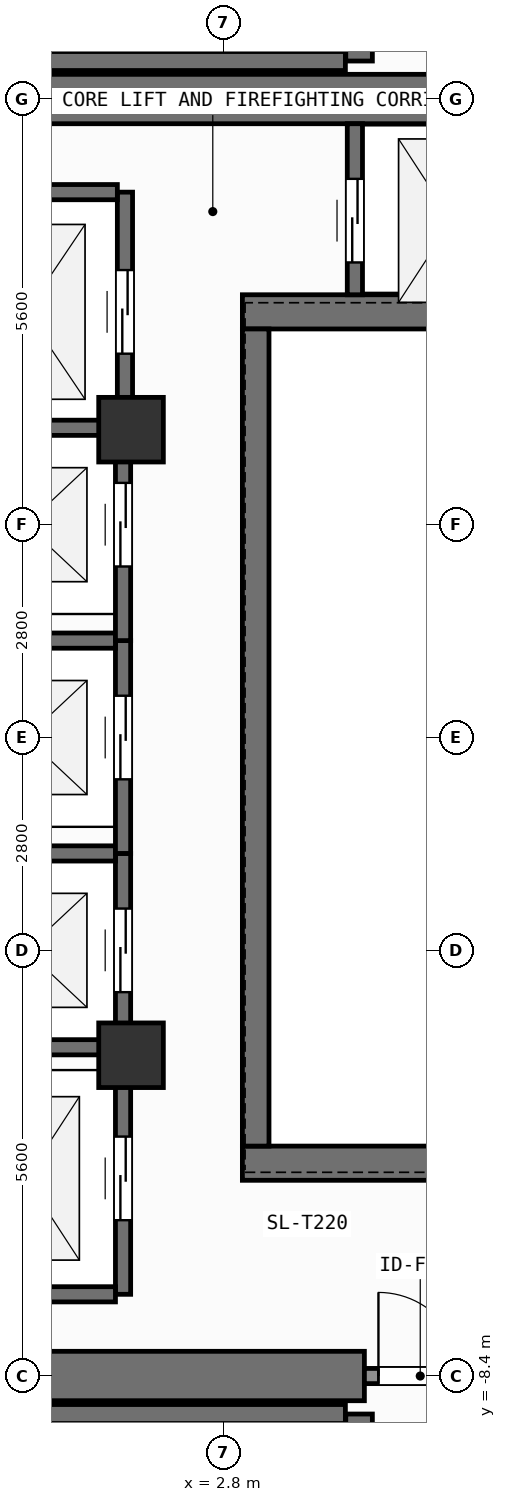
"""IFC4 building model, lengths in metres.
Left out: names, types, materials, properties, quantities, classifications, styles, units other than length and angle.
Written with IfcOpenShell. Run it as: python <this file> out.ifc"""

import sys

from ifc_helpers import new_model, si_unit, direction, frame, frame_2d, origin, origin_2d, place, context, subcontext, project, spatial, rectangle, extrude, element, fill, save


model = new_model("IFC4")
c1 = context("Model", 3, precision=1e-05, world=origin(), true_north=direction((0.0, 1.0)))
c2 = subcontext(c1, "Body", "Model", "MODEL_VIEW")
j1 = project(units=[si_unit("LENGTHUNIT", "METRE"), si_unit("PLANEANGLEUNIT", "RADIAN")], contexts=[c1])
p1 = place(None, origin())
s1 = spatial("IfcSite", under=j1, at=p1, CompositionType="ELEMENT")
p2 = place(p1, origin())
s2 = spatial("IfcBuilding", under=s1, at=p2, CompositionType="ELEMENT")
p3 = place(p2, frame((0.0, 0.0, 250.8)))
s3 = spatial("IfcBuildingStorey", under=s2, at=p3, CompositionType="ELEMENT", Elevation=250.8)
p4 = place(p3, frame((-2.62, -8.4, 0.0), z_axis=(0.0, 0.0, 1.0), x_axis=(1.0, 0.0, 0.0)))
e1 = element("IfcWall", 1, at=p4, inside=s3, PredefinedType="SHEAR", context=c2, shape_type="SweptSolid", body=[
    extrude(rectangle(XDim=7.27, YDim=0.65, at=frame_2d((3.635, 0.0))), origin(), (0.0, 0.0, 1.0), 3.9),
])
p5 = place(p3, frame((-7.55, 8.4, 0.0), z_axis=(0.0, 0.0, 1.0), x_axis=(1.0, 0.0, 0.0)))
e2 = element("IfcWall", 2, at=p5, inside=s3, PredefinedType="SHEAR", context=c2, shape_type="SweptSolid", body=[
    extrude(rectangle(XDim=16.275, YDim=0.65, at=frame_2d((8.138, 0.0))), origin(), (0.0, 0.0, 1.0), 3.9),
])
for number, where, z_axis, x_axis in (
    (3, (3.045, -5.6, 0.0), (0.0, 0.0, 1.0), (1.0, 0.0, 0.0)),
    (4, (3.045, 5.6, 0.0), (0.0, 0.0, 1.0), (1.0, 0.0, 0.0)),
):
    element("IfcWall", number, at=place(p3, frame(where, z_axis=z_axis, x_axis=x_axis)), inside=s3, PredefinedType="SHEAR", context=c2, shape_type="SweptSolid", body=[
        extrude(rectangle(XDim=5.68, YDim=0.45, at=frame_2d((2.84, 0.0))), origin(), (0.0, 0.0, 1.0), 3.9),
    ])
p6 = place(p3, frame((3.22, -5.375, 0.0), z_axis=(0.0, 0.0, 1.0), x_axis=(0.0, 1.0, 0.0)))
e5 = element("IfcWall", 5, at=p6, inside=s3, PredefinedType="SHEAR", context=c2, shape_type="SweptSolid", body=[
    extrude(rectangle(XDim=10.75, YDim=0.35, at=frame_2d((5.375, 0.0))), origin(), (0.0, 0.0, 1.0), 3.9),
])
p7 = place(p3, frame((-2.2, -8.9, 0.0), z_axis=(0.0, 0.0, 1.0), x_axis=(1.0, 0.0, 0.0)))
e6 = element("IfcWall", 6, at=p7, inside=s3, PredefinedType="SHEAR", context=c2, shape_type="SweptSolid", body=[
    extrude(rectangle(XDim=6.6, YDim=0.25, at=frame_2d((3.3, 0.0))), origin(), (0.0, 0.0, 1.0), 3.9),
])
p8 = place(p3, frame((4.58, -8.9, 0.0), z_axis=(0.0, 0.0, 1.0), x_axis=(0.0, -1.0, 0.0)))
e7 = element("IfcWall", 7, at=p8, inside=s3, PredefinedType="SHEAR", context=c2, shape_type="SweptSolid", body=[
    extrude(rectangle(XDim=2.925, YDim=0.35, at=frame_2d((1.462, 0.0))), origin(), (0.0, 0.0, 1.0), 3.9),
])
p9 = place(p8, frame((0.913, 0.0, 0.0)))
e8 = element("IfcOpeningElement", 8, at=p9, cuts=e7, PredefinedType="OPENING", context=c2, shape_type="SweptSolid", body=[
    extrude(rectangle(XDim=1.1, YDim=2.15, at=frame_2d((0.55, 1.075))), frame((0.0, 0.185, 0.0), z_axis=(0.0, -1.0, 0.0), x_axis=(1.0, 0.0, 0.0)), (0.0, 0.0, 1.0), 0.37),
])
p10 = place(p3, frame((-2.2, 8.9, 0.0), z_axis=(0.0, 0.0, 1.0), x_axis=(1.0, 0.0, 0.0)))
e9 = element("IfcWall", 9, at=p10, inside=s3, PredefinedType="SHEAR", context=c2, shape_type="SweptSolid", body=[
    extrude(rectangle(XDim=6.6, YDim=0.25, at=frame_2d((3.3, 0.0))), origin(), (0.0, 0.0, 1.0), 3.9),
])
p11 = place(p3, frame((4.58, 11.825, 0.0), z_axis=(0.0, 0.0, 1.0), x_axis=(0.0, -1.0, 0.0)))
e10 = element("IfcWall", 10, at=p11, inside=s3, PredefinedType="SHEAR", context=c2, shape_type="SweptSolid", body=[
    extrude(rectangle(XDim=2.925, YDim=0.35, at=frame_2d((1.462, 0.0))), origin(), (0.0, 0.0, 1.0), 3.9),
])
p12 = place(p11, frame((0.913, 0.0, 0.0)))
e11 = element("IfcOpeningElement", 11, at=p12, cuts=e10, PredefinedType="OPENING", context=c2, shape_type="SweptSolid", body=[
    extrude(rectangle(XDim=1.1, YDim=2.15, at=frame_2d((0.55, 1.075))), frame((0.0, 0.185, 0.0), z_axis=(0.0, -1.0, 0.0), x_axis=(1.0, 0.0, 0.0)), (0.0, 0.0, 1.0), 0.37),
])
for number, where, z_axis, x_axis in (
    (12, (1.58, -4.18, 0.0), (0.0, 0.0, 1.0), (1.0, 0.0, 0.0)),
    (13, (1.58, 4.05, 0.0), (0.0, 0.0, 1.0), (1.0, 0.0, 0.0)),
):
    element("IfcColumn", number, at=place(p3, frame(where, z_axis=z_axis, x_axis=x_axis)), inside=s3, PredefinedType="COLUMN", context=c2, shape_type="SweptSolid", body=[
        extrude(rectangle(XDim=0.85, YDim=0.85, at=origin_2d()), origin(), (0.0, 0.0, 1.0), 3.9),
    ])
p13 = place(p3, frame((1.475, -4.275, 0.0), z_axis=(0.0, 0.0, 1.0), x_axis=(0.0, 1.0, 0.0)))
e14 = element("IfcWall", 14, at=p13, inside=s3, PredefinedType="SHEAR", context=c2, shape_type="SweptSolid", body=[
    extrude(rectangle(XDim=2.75, YDim=0.2, at=frame_2d((1.375, 0.0))), origin(), (0.0, 0.0, 1.0), 3.62),
])
p14 = place(p13, frame((0.925, 0.0, 0.0)))
e15 = element("IfcOpeningElement", 15, at=p14, cuts=e14, PredefinedType="OPENING", context=c2, shape_type="SweptSolid", body=[
    extrude(rectangle(XDim=1.1, YDim=2.2, at=frame_2d((0.55, 1.1))), frame((0.0, 0.11, 0.0), z_axis=(0.0, -1.0, 0.0), x_axis=(1.0, 0.0, 0.0)), (0.0, 0.0, 1.0), 0.22),
])
for number, where, z_axis, x_axis in (
    (16, (-0.975, -4.075, 0.0), (0.0, 0.0, 1.0), (1.0, 0.0, 0.0)),
    (17, (-0.975, -1.525, 0.0), (0.0, 0.0, 1.0), (1.0, 0.0, 0.0)),
):
    element("IfcWall", number, at=place(p3, frame(where, z_axis=z_axis, x_axis=x_axis)), inside=s3, PredefinedType="SHEAR", context=c2, shape_type="SweptSolid", body=[
        extrude(rectangle(XDim=2.35, YDim=0.2, at=frame_2d((1.175, 0.0))), origin(), (0.0, 0.0, 1.0), 3.62),
    ])
p15 = place(p3, frame((1.475, -1.525, 0.0), z_axis=(0.0, 0.0, 1.0), x_axis=(0.0, 1.0, 0.0)))
e18 = element("IfcWall", 18, at=p15, inside=s3, PredefinedType="SHEAR", context=c2, shape_type="SweptSolid", body=[
    extrude(rectangle(XDim=2.8, YDim=0.2, at=frame_2d((1.4, 0.0))), origin(), (0.0, 0.0, 1.0), 3.62),
])
p16 = place(p15, frame((0.975, 0.0, 0.0)))
e19 = element("IfcOpeningElement", 19, at=p16, cuts=e18, PredefinedType="OPENING", context=c2, shape_type="SweptSolid", body=[
    extrude(rectangle(XDim=1.1, YDim=2.2, at=frame_2d((0.55, 1.1))), frame((0.0, 0.11, 0.0), z_axis=(0.0, -1.0, 0.0), x_axis=(1.0, 0.0, 0.0)), (0.0, 0.0, 1.0), 0.22),
])
p17 = place(p3, frame((-0.975, 1.275, 0.0), z_axis=(0.0, 0.0, 1.0), x_axis=(1.0, 0.0, 0.0)))
e20 = element("IfcWall", 20, at=p17, inside=s3, PredefinedType="SHEAR", context=c2, shape_type="SweptSolid", body=[
    extrude(rectangle(XDim=2.35, YDim=0.2, at=frame_2d((1.175, 0.0))), origin(), (0.0, 0.0, 1.0), 3.62),
])
p18 = place(p3, frame((1.475, 1.275, 0.0), z_axis=(0.0, 0.0, 1.0), x_axis=(0.0, 1.0, 0.0)))
e21 = element("IfcWall", 21, at=p18, inside=s3, PredefinedType="SHEAR", context=c2, shape_type="SweptSolid", body=[
    extrude(rectangle(XDim=2.8, YDim=0.2, at=frame_2d((1.4, 0.0))), origin(), (0.0, 0.0, 1.0), 3.62),
])
p19 = place(p18, frame((0.975, 0.0, 0.0)))
e22 = element("IfcOpeningElement", 22, at=p19, cuts=e21, PredefinedType="OPENING", context=c2, shape_type="SweptSolid", body=[
    extrude(rectangle(XDim=1.1, YDim=2.2, at=frame_2d((0.55, 1.1))), frame((0.0, 0.11, 0.0), z_axis=(0.0, -1.0, 0.0), x_axis=(1.0, 0.0, 0.0)), (0.0, 0.0, 1.0), 0.22),
])
p20 = place(p3, frame((-0.975, 4.075, 0.0), z_axis=(0.0, 0.0, 1.0), x_axis=(1.0, 0.0, 0.0)))
e23 = element("IfcWall", 23, at=p20, inside=s3, PredefinedType="SHEAR", context=c2, shape_type="SweptSolid", body=[
    extrude(rectangle(XDim=2.35, YDim=0.2, at=frame_2d((1.175, 0.0))), origin(), (0.0, 0.0, 1.0), 3.62),
])
p21 = place(p3, frame((1.5, 4.025, 0.0), z_axis=(0.0, 0.0, 1.0), x_axis=(0.0, 1.0, 0.0)))
e24 = element("IfcWall", 24, at=p21, inside=s3, PredefinedType="SHEAR", context=c2, shape_type="SweptSolid", body=[
    extrude(rectangle(XDim=3.15, YDim=0.2, at=frame_2d((1.575, 0.0))), origin(), (0.0, 0.0, 1.0), 3.62),
])
p22 = place(p21, frame((1.025, 0.0, 0.0)))
e25 = element("IfcOpeningElement", 25, at=p22, cuts=e24, PredefinedType="OPENING", context=c2, shape_type="SweptSolid", body=[
    extrude(rectangle(XDim=1.1, YDim=2.2, at=frame_2d((0.55, 1.1))), frame((0.0, 0.11, 0.0), z_axis=(0.0, -1.0, 0.0), x_axis=(1.0, 0.0, 0.0)), (0.0, 0.0, 1.0), 0.22),
])
p23 = place(p3, frame((-1.0, 7.175, 0.0), z_axis=(0.0, 0.0, 1.0), x_axis=(1.0, 0.0, 0.0)))
e26 = element("IfcWall", 26, at=p23, inside=s3, PredefinedType="SHEAR", context=c2, shape_type="SweptSolid", body=[
    extrude(rectangle(XDim=2.4, YDim=0.2, at=frame_2d((1.2, 0.0))), origin(), (0.0, 0.0, 1.0), 3.62),
])
p24 = place(p3, frame((1.475, -7.325, 0.0), z_axis=(0.0, 0.0, 1.0), x_axis=(0.0, 1.0, 0.0)))
e27 = element("IfcWall", 27, at=p24, inside=s3, PredefinedType="SHEAR", context=c2, shape_type="SweptSolid", body=[
    extrude(rectangle(XDim=3.05, YDim=0.2, at=frame_2d((1.525, 0.0))), origin(), (0.0, 0.0, 1.0), 3.62),
])
p25 = place(p24, frame((0.975, 0.0, 0.0)))
e28 = element("IfcOpeningElement", 28, at=p25, cuts=e27, PredefinedType="OPENING", context=c2, shape_type="SweptSolid", body=[
    extrude(rectangle(XDim=1.1, YDim=2.2, at=frame_2d((0.55, 1.1))), frame((0.0, 0.11, 0.0), z_axis=(0.0, -1.0, 0.0), x_axis=(1.0, 0.0, 0.0)), (0.0, 0.0, 1.0), 0.22),
])
p26 = place(p3, frame((-0.975, -7.325, 0.0), z_axis=(0.0, 0.0, 1.0), x_axis=(1.0, 0.0, 0.0)))
e29 = element("IfcWall", 29, at=p26, inside=s3, PredefinedType="SHEAR", context=c2, shape_type="SweptSolid", body=[
    extrude(rectangle(XDim=2.35, YDim=0.2, at=frame_2d((1.175, 0.0))), origin(), (0.0, 0.0, 1.0), 3.62),
])
p27 = place(p3, frame((4.525, 5.825, 0.0), z_axis=(0.0, 0.0, 1.0), x_axis=(0.0, 1.0, 0.0)))
e30 = element("IfcWall", 30, at=p27, inside=s3, PredefinedType="SHEAR", context=c2, shape_type="SweptSolid", body=[
    extrude(rectangle(XDim=2.25, YDim=0.2, at=frame_2d((1.125, 0.0))), origin(), (0.0, 0.0, 1.0), 3.62),
])
p28 = place(p27, frame((0.425, 0.0, 0.0)))
e31 = element("IfcOpeningElement", 31, at=p28, cuts=e30, PredefinedType="OPENING", context=c2, shape_type="SweptSolid", body=[
    extrude(rectangle(XDim=1.1, YDim=2.2, at=frame_2d((0.55, 1.1))), frame((0.0, 0.11, 0.0), z_axis=(0.0, -1.0, 0.0), x_axis=(1.0, 0.0, 0.0)), (0.0, 0.0, 1.0), 0.22),
])
p29 = place(p3, frame((4.65, -8.4, 0.0), z_axis=(0.0, 0.0, 1.0), x_axis=(1.0, 0.0, 0.0)))
e32 = element("IfcWall", 32, at=p29, inside=s3, PredefinedType="SOLIDWALL", context=c2, shape_type="SweptSolid", body=[
    extrude(rectangle(XDim=1.47, YDim=0.2, at=frame_2d((0.735, 0.0))), origin(), (0.0, 0.0, 1.0), 2.86),
])
p30 = place(p29, frame((0.185, 0.0, 0.0)))
e33 = element("IfcOpeningElement", 33, at=p30, cuts=e32, PredefinedType="OPENING", context=c2, shape_type="SweptSolid", body=[
    extrude(rectangle(XDim=1.1, YDim=2.15, at=frame_2d((0.55, 1.075))), frame((0.0, 0.11, 0.0), z_axis=(0.0, -1.0, 0.0), x_axis=(1.0, 0.0, 0.0)), (0.0, 0.0, 1.0), 0.22),
])
p31 = place(p14, origin())
e34 = element("IfcDoor", 34, at=p31, inside=s3, OperationType="SLIDING_TO_LEFT", PredefinedType="DOOR", context=c2, shape_type="SweptSolid", body=[
    extrude(rectangle(XDim=1.1, YDim=2.2, at=frame_2d((0.55, 1.1))), frame((0.0, 0.025, 0.0), z_axis=(0.0, -1.0, 0.0), x_axis=(1.0, 0.0, 0.0)), (0.0, 0.0, 1.0), 0.05),
])
fill(e15, e34)
p32 = place(p16, origin())
e35 = element("IfcDoor", 35, at=p32, inside=s3, OperationType="SLIDING_TO_LEFT", PredefinedType="DOOR", context=c2, shape_type="SweptSolid", body=[
    extrude(rectangle(XDim=1.1, YDim=2.2, at=frame_2d((0.55, 1.1))), frame((0.0, 0.025, 0.0), z_axis=(0.0, -1.0, 0.0), x_axis=(1.0, 0.0, 0.0)), (0.0, 0.0, 1.0), 0.05),
])
fill(e19, e35)
p33 = place(p19, origin())
e36 = element("IfcDoor", 36, at=p33, inside=s3, OperationType="SLIDING_TO_LEFT", PredefinedType="DOOR", context=c2, shape_type="SweptSolid", body=[
    extrude(rectangle(XDim=1.1, YDim=2.2, at=frame_2d((0.55, 1.1))), frame((0.0, 0.025, 0.0), z_axis=(0.0, -1.0, 0.0), x_axis=(1.0, 0.0, 0.0)), (0.0, 0.0, 1.0), 0.05),
])
fill(e22, e36)
p34 = place(p22, origin())
e37 = element("IfcDoor", 37, at=p34, inside=s3, OperationType="SLIDING_TO_LEFT", PredefinedType="DOOR", context=c2, shape_type="SweptSolid", body=[
    extrude(rectangle(XDim=1.1, YDim=2.2, at=frame_2d((0.55, 1.1))), frame((0.0, 0.025, 0.0), z_axis=(0.0, -1.0, 0.0), x_axis=(1.0, 0.0, 0.0)), (0.0, 0.0, 1.0), 0.05),
])
fill(e25, e37)
p35 = place(p25, origin())
e38 = element("IfcDoor", 38, at=p35, inside=s3, OperationType="SLIDING_TO_LEFT", PredefinedType="DOOR", context=c2, shape_type="SweptSolid", body=[
    extrude(rectangle(XDim=1.1, YDim=2.2, at=frame_2d((0.55, 1.1))), frame((0.0, 0.025, 0.0), z_axis=(0.0, -1.0, 0.0), x_axis=(1.0, 0.0, 0.0)), (0.0, 0.0, 1.0), 0.05),
])
fill(e28, e38)
p36 = place(p28, origin())
e39 = element("IfcDoor", 39, at=p36, inside=s3, OperationType="SLIDING_TO_LEFT", PredefinedType="DOOR", context=c2, shape_type="SweptSolid", body=[
    extrude(rectangle(XDim=1.1, YDim=2.2, at=frame_2d((0.55, 1.1))), frame((0.0, 0.025, 0.0), z_axis=(0.0, -1.0, 0.0), x_axis=(1.0, 0.0, 0.0)), (0.0, 0.0, 1.0), 0.05),
])
fill(e31, e39)
p37 = place(p30, origin())
e40 = element("IfcDoor", 40, at=p37, inside=s3, OperationType="SINGLE_SWING_LEFT", PredefinedType="DOOR", context=c2, shape_type="SweptSolid", body=[
    extrude(rectangle(XDim=1.1, YDim=2.15, at=frame_2d((0.55, 1.075))), frame((0.0, 0.025, 0.0), z_axis=(0.0, -1.0, 0.0), x_axis=(1.0, 0.0, 0.0)), (0.0, 0.0, 1.0), 0.05),
])
fill(e33, e40)
save(model, sys.argv[1])
